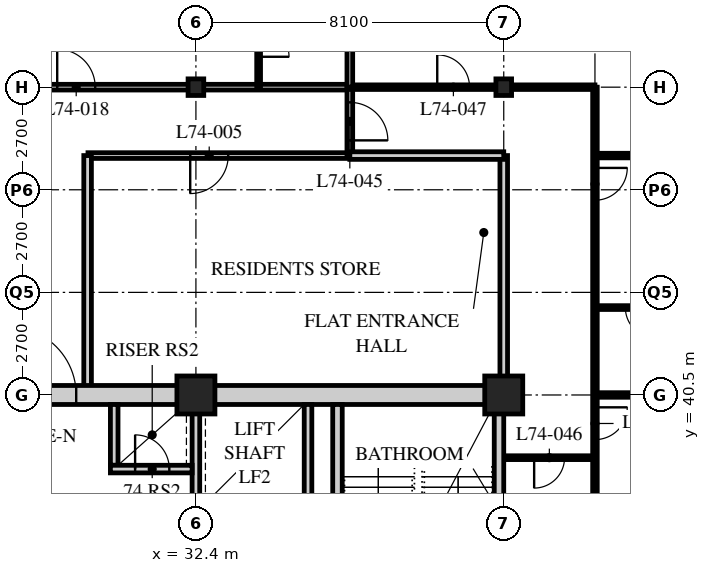
"""IFC4 building model, lengths in metres.
Left out: names, types, materials, properties, quantities, classifications, styles, units other than length and angle.
Written with IfcOpenShell. Run it as: python <this file> out.ifc"""

import sys

from ifc_helpers import new_model, si_unit, direction, frame, frame_2d, origin, origin_2d, place, context, subcontext, project, spatial, rectangle, hollow_rectangle, i_section, extrude, element, fill, save


model = new_model("IFC4")
c1 = context("Model", 3, precision=1e-05, world=origin(), true_north=direction((0.0, 1.0)))
c2 = subcontext(c1, "Body", "Model", "MODEL_VIEW")
j1 = project(units=[si_unit("LENGTHUNIT", "METRE"), si_unit("PLANEANGLEUNIT", "RADIAN")], contexts=[c1])
p1 = place(None, origin())
s1 = spatial("IfcSite", under=j1, at=p1, CompositionType="ELEMENT")
p2 = place(p1, origin())
s2 = spatial("IfcBuilding", under=s1, at=p2, CompositionType="ELEMENT")
p3 = place(p2, frame((0.0, 0.0, 289.2)))
s3 = spatial("IfcBuildingStorey", under=s2, at=p3, CompositionType="ELEMENT", Elevation=289.2)
p4 = place(p3, frame((32.4, 40.5, 0.0), z_axis=(0.0, 0.0, 1.0), x_axis=(1.0, 0.0, 0.0)))
e1 = element("IfcColumn", 1, at=p4, inside=s3, PredefinedType="COLUMN", context=c2, shape_type="SweptSolid", body=[
    extrude(hollow_rectangle(XDim=1.0, YDim=1.0, WallThickness=0.1, at=origin_2d()), origin(), (0.0, 0.0, 1.0), 3.9),
])
p5 = place(p3, frame((32.4, 48.6, 0.0), z_axis=(0.0, 0.0, 1.0), x_axis=(1.0, 0.0, 0.0)))
e2 = element("IfcColumn", 2, at=p5, inside=s3, PredefinedType="COLUMN", context=c2, shape_type="SweptSolid", body=[
    extrude(i_section(OverallWidth=0.412, OverallDepth=0.437, WebThickness=0.036, FlangeThickness=0.058, FilletRadius=0.015, at=origin_2d()), origin(), (0.0, 0.0, 1.0), 3.9),
])
p6 = place(p3, frame((40.5, 40.5, 0.0), z_axis=(0.0, 0.0, 1.0), x_axis=(1.0, 0.0, 0.0)))
e3 = element("IfcColumn", 3, at=p6, inside=s3, PredefinedType="COLUMN", context=c2, shape_type="SweptSolid", body=[
    extrude(hollow_rectangle(XDim=1.0, YDim=1.0, WallThickness=0.1, at=origin_2d()), origin(), (0.0, 0.0, 1.0), 3.9),
])
p7 = place(p3, frame((40.5, 48.6, 0.0), z_axis=(0.0, 0.0, 1.0), x_axis=(1.0, 0.0, 0.0)))
e4 = element("IfcColumn", 4, at=p7, inside=s3, PredefinedType="COLUMN", context=c2, shape_type="SweptSolid", body=[
    extrude(i_section(OverallWidth=0.412, OverallDepth=0.437, WebThickness=0.036, FlangeThickness=0.058, FilletRadius=0.015, at=origin_2d()), origin(), (0.0, 0.0, 1.0), 3.9),
])
p8 = place(p3, frame((12.15, 48.6, 0.0), z_axis=(0.0, 0.0, 1.0), x_axis=(1.0, 0.0, 0.0)))
e5 = element("IfcWall", 5, at=p8, inside=s3, PredefinedType="PARTITIONING", context=c2, shape_type="SweptSolid", body=[
    extrude(rectangle(XDim=24.3, YDim=0.15, at=frame_2d((12.15, 0.0))), origin(), (0.0, 0.0, 1.0), 3.078),
])
p9 = place(p8, frame((4.95, 0.0, 0.0)))
e6 = element("IfcOpeningElement", 6, at=p9, cuts=e5, PredefinedType="OPENING", context=c2, shape_type="SweptSolid", body=[
    extrude(rectangle(XDim=1.0, YDim=2.1, at=frame_2d((0.5, 1.05))), frame((0.0, 0.085, 0.0), z_axis=(0.0, -1.0, 0.0), x_axis=(1.0, 0.0, 0.0)), (0.0, 0.0, 1.0), 0.17),
])
p10 = place(p8, frame((16.6, 0.0, 0.0)))
e7 = element("IfcOpeningElement", 7, at=p10, cuts=e5, PredefinedType="OPENING", context=c2, shape_type="SweptSolid", body=[
    extrude(rectangle(XDim=1.0, YDim=2.1, at=frame_2d((0.5, 1.05))), frame((0.0, 0.085, 0.0), z_axis=(0.0, -1.0, 0.0), x_axis=(1.0, 0.0, 0.0)), (0.0, 0.0, 1.0), 0.17),
])
p11 = place(p8, frame((1.525, 0.0, 0.0)))
e8 = element("IfcOpeningElement", 8, at=p11, cuts=e5, PredefinedType="OPENING", context=c2, shape_type="SweptSolid", body=[
    extrude(rectangle(XDim=1.0, YDim=2.1, at=frame_2d((0.5, 1.05))), frame((0.0, 0.085, 0.0), z_axis=(0.0, -1.0, 0.0), x_axis=(1.0, 0.0, 0.0)), (0.0, 0.0, 1.0), 0.17),
])
p12 = place(p3, frame((29.56, 46.8, 0.0), z_axis=(0.0, 0.0, 1.0), x_axis=(1.0, 0.0, 0.0)))
e9 = element("IfcWall", 9, at=p12, inside=s3, PredefinedType="PARTITIONING", context=c2, shape_type="SweptSolid", body=[
    extrude(rectangle(XDim=6.89, YDim=0.15, at=frame_2d((3.445, 0.0))), origin(), (0.0, 0.0, 1.0), 3.69),
])
p13 = place(p12, frame((2.69, 0.0, 0.0)))
e10 = element("IfcOpeningElement", 10, at=p13, cuts=e9, PredefinedType="OPENING", context=c2, shape_type="SweptSolid", body=[
    extrude(rectangle(XDim=1.0, YDim=2.1, at=frame_2d((0.5, 1.05))), frame((0.0, 0.085, 0.0), z_axis=(0.0, -1.0, 0.0), x_axis=(1.0, 0.0, 0.0)), (0.0, 0.0, 1.0), 0.17),
])
p14 = place(p3, frame((29.55, 40.5, 0.0), z_axis=(0.0, 0.0, 1.0), x_axis=(0.0, 1.0, 0.0)))
e11 = element("IfcWall", 11, at=p14, inside=s3, PredefinedType="SOLIDWALL", context=c2, shape_type="SweptSolid", body=[
    extrude(rectangle(XDim=6.3, YDim=0.2, at=frame_2d((3.15, 0.0))), origin(), (0.0, 0.0, 1.0), 3.69),
])
p15 = place(p3, frame((36.45, 46.8, 0.0), z_axis=(0.0, 0.0, 1.0), x_axis=(0.0, 1.0, 0.0)))
e12 = element("IfcWall", 12, at=p15, inside=s3, PredefinedType="PARTITIONING", context=c2, shape_type="SweptSolid", body=[
    extrude(rectangle(XDim=1.8, YDim=0.15, at=frame_2d((0.9, 0.0))), origin(), (0.0, 0.0, 1.0), 3.69),
])
p16 = place(p15, frame((0.4, 0.0, 0.0)))
e13 = element("IfcOpeningElement", 13, at=p16, cuts=e12, PredefinedType="OPENING", context=c2, shape_type="SweptSolid", body=[
    extrude(rectangle(XDim=1.0, YDim=2.1, at=frame_2d((0.5, 1.05))), frame((0.0, 0.085, 0.0), z_axis=(0.0, -1.0, 0.0), x_axis=(1.0, 0.0, 0.0)), (0.0, 0.0, 1.0), 0.17),
])
p17 = place(p3, frame((40.5, 40.5, 0.0), z_axis=(0.0, 0.0, 1.0), x_axis=(0.0, 1.0, 0.0)))
e14 = element("IfcWall", 14, at=p17, inside=s3, PredefinedType="SOLIDWALL", context=c2, shape_type="SweptSolid", body=[
    extrude(rectangle(XDim=6.3, YDim=0.2, at=frame_2d((3.15, 0.0))), origin(), (0.0, 0.0, 1.0), 3.078),
])
p18 = place(p3, frame((34.05, 48.6, 0.0), z_axis=(0.0, 0.0, 1.0), x_axis=(0.0, 1.0, 0.0)))
e15 = element("IfcWall", 15, at=p18, inside=s3, PredefinedType="PARTITIONING", context=c2, shape_type="SweptSolid", body=[
    extrude(rectangle(XDim=2.4, YDim=0.1, at=frame_2d((1.2, 0.0))), origin(), (0.0, 0.0, 1.0), 3.69),
])
p19 = place(p18, frame((0.8, 0.0, 0.0)))
e16 = element("IfcOpeningElement", 16, at=p19, cuts=e15, PredefinedType="OPENING", context=c2, shape_type="SweptSolid", body=[
    extrude(rectangle(XDim=0.8, YDim=2.1, at=frame_2d((0.4, 1.05))), frame((0.0, 0.06, 0.0), z_axis=(0.0, -1.0, 0.0), x_axis=(1.0, 0.0, 0.0)), (0.0, 0.0, 1.0), 0.12),
])
p20 = place(p3, frame((40.5, 38.85, 0.0), z_axis=(0.0, 0.0, 1.0), x_axis=(1.0, 0.0, 0.0)))
e17 = element("IfcWall", 17, at=p20, inside=s3, PredefinedType="PARTITIONING", context=c2, shape_type="SweptSolid", body=[
    extrude(rectangle(XDim=2.4, YDim=0.1, at=frame_2d((1.2, 0.0))), origin(), (0.0, 0.0, 1.0), 3.69),
])
p21 = place(p20, frame((0.8, 0.0, 0.0)))
e18 = element("IfcOpeningElement", 18, at=p21, cuts=e17, PredefinedType="OPENING", context=c2, shape_type="SweptSolid", body=[
    extrude(rectangle(XDim=0.8, YDim=2.1, at=frame_2d((0.4, 1.05))), frame((0.0, 0.06, 0.0), z_axis=(0.0, -1.0, 0.0), x_axis=(1.0, 0.0, 0.0)), (0.0, 0.0, 1.0), 0.12),
])
p22 = place(p3, frame((42.9, 48.6, 0.0), z_axis=(0.0, 0.0, 1.0), x_axis=(0.0, -1.0, 0.0)))
e19 = element("IfcWall", 19, at=p22, inside=s3, PredefinedType="PARTITIONING", context=c2, shape_type="SweptSolid", body=[
    extrude(rectangle(XDim=12.15, YDim=0.12, at=frame_2d((6.075, 0.0))), origin(), (0.0, 0.0, 1.0), 3.69),
])
p23 = place(p22, frame((2.125, 0.0, 0.0)))
e20 = element("IfcOpeningElement", 20, at=p23, cuts=e19, PredefinedType="OPENING", context=c2, shape_type="SweptSolid", body=[
    extrude(rectangle(XDim=0.85, YDim=2.1, at=frame_2d((0.425, 1.05))), frame((0.0, 0.07, 0.0), z_axis=(0.0, -1.0, 0.0), x_axis=(1.0, 0.0, 0.0)), (0.0, 0.0, 1.0), 0.14),
])
p24 = place(p22, frame((8.425, 0.0, 0.0)))
e21 = element("IfcOpeningElement", 21, at=p24, cuts=e19, PredefinedType="OPENING", context=c2, shape_type="SweptSolid", body=[
    extrude(rectangle(XDim=0.85, YDim=2.1, at=frame_2d((0.425, 1.05))), frame((0.0, 0.07, 0.0), z_axis=(0.0, -1.0, 0.0), x_axis=(1.0, 0.0, 0.0)), (0.0, 0.0, 1.0), 0.14),
])
p25 = place(p3, frame((36.45, 48.6, 0.0), z_axis=(0.0, 0.0, 1.0), x_axis=(1.0, 0.0, 0.0)))
e22 = element("IfcWall", 22, at=p25, inside=s3, PredefinedType="PARTITIONING", context=c2, shape_type="SweptSolid", body=[
    extrude(rectangle(XDim=6.45, YDim=0.12, at=frame_2d((3.225, 0.0))), origin(), (0.0, 0.0, 1.0), 3.078),
])
p26 = place(p25, frame((2.3, 0.0, 0.0)))
e23 = element("IfcOpeningElement", 23, at=p26, cuts=e22, PredefinedType="OPENING", context=c2, shape_type="SweptSolid", body=[
    extrude(rectangle(XDim=0.85, YDim=2.1, at=frame_2d((0.425, 1.05))), frame((0.0, 0.07, 0.0), z_axis=(0.0, -1.0, 0.0), x_axis=(1.0, 0.0, 0.0)), (0.0, 0.0, 1.0), 0.14),
])
p27 = place(p3, frame((36.45, 46.8, 0.0), z_axis=(0.0, 0.0, 1.0), x_axis=(1.0, 0.0, 0.0)))
e24 = element("IfcWall", 24, at=p27, inside=s3, PredefinedType="SOLIDWALL", context=c2, shape_type="SweptSolid", body=[
    extrude(rectangle(XDim=4.05, YDim=0.2, at=frame_2d((2.025, 0.0))), origin(), (0.0, 0.0, 1.0), 3.69),
])
p28 = place(p3, frame((42.9, 46.8, 0.0), z_axis=(0.0, 0.0, 1.0), x_axis=(1.0, 0.0, 0.0)))
e25 = element("IfcWall", 25, at=p28, inside=s3, PredefinedType="PARTITIONING", context=c2, shape_type="SweptSolid", body=[
    extrude(rectangle(XDim=13.5, YDim=0.12, at=frame_2d((6.75, 0.0))), origin(), (0.0, 0.0, 1.0), 3.69),
])
p29 = place(p3, frame((36.45, 64.5, 0.0), z_axis=(0.0, 0.0, 1.0), x_axis=(0.0, -1.0, 0.0)))
e26 = element("IfcWall", 26, at=p29, inside=s3, PredefinedType="PARTITIONING", context=c2, shape_type="SweptSolid", body=[
    extrude(rectangle(XDim=15.9, YDim=0.15, at=frame_2d((7.95, 0.0))), origin(), (0.0, 0.0, 1.0), 3.69),
])
p30 = place(p3, frame((42.9, 42.8, 0.0), z_axis=(0.0, 0.0, 1.0), x_axis=(1.0, 0.0, 0.0)))
e27 = element("IfcWall", 27, at=p30, inside=s3, PredefinedType="PARTITIONING", context=c2, shape_type="SweptSolid", body=[
    extrude(rectangle(XDim=2.4, YDim=0.1, at=frame_2d((1.2, 0.0))), origin(), (0.0, 0.0, 1.0), 3.69),
])
p31 = place(p30, frame((0.8, 0.0, 0.0)))
e28 = element("IfcOpeningElement", 28, at=p31, cuts=e27, PredefinedType="OPENING", context=c2, shape_type="SweptSolid", body=[
    extrude(rectangle(XDim=0.8, YDim=2.1, at=frame_2d((0.4, 1.05))), frame((0.0, 0.06, 0.0), z_axis=(0.0, -1.0, 0.0), x_axis=(1.0, 0.0, 0.0)), (0.0, 0.0, 1.0), 0.12),
])
p32 = place(p3, frame((42.9, 40.5, 0.0), z_axis=(0.0, 0.0, 1.0), x_axis=(1.0, 0.0, 0.0)))
e29 = element("IfcWall", 29, at=p32, inside=s3, PredefinedType="PARTITIONING", context=c2, shape_type="SweptSolid", body=[
    extrude(rectangle(XDim=13.5, YDim=0.12, at=frame_2d((6.75, 0.0))), origin(), (0.0, 0.0, 1.0), 3.078),
])
p33 = place(p3, frame((15.95, 40.5, 0.0), z_axis=(0.0, 0.0, 1.0), x_axis=(1.0, 0.0, 0.0)))
e30 = element("IfcWall", 30, at=p33, inside=s3, PredefinedType="SOLIDWALL", context=c2, shape_type="SweptSolid", body=[
    extrude(rectangle(XDim=24.55, YDim=0.5, at=frame_2d((12.275, 0.0))), origin(), (0.0, 0.0, 1.0), 3.04),
])
p34 = place(p33, frame((11.5, 0.0, 0.0)))
e31 = element("IfcOpeningElement", 31, at=p34, cuts=e30, PredefinedType="OPENING", context=c2, shape_type="SweptSolid", body=[
    extrude(rectangle(XDim=1.8, YDim=2.4, at=frame_2d((0.9, 1.2))), frame((0.0, 0.26, 0.0), z_axis=(0.0, -1.0, 0.0), x_axis=(1.0, 0.0, 0.0)), (0.0, 0.0, 1.0), 0.52),
])
p35 = place(p3, frame((40.375, 24.55, 0.0), z_axis=(0.0, 0.0, 1.0), x_axis=(0.0, 1.0, 0.0)))
e32 = element("IfcWall", 32, at=p35, inside=s3, PredefinedType="SOLIDWALL", context=c2, shape_type="SweptSolid", body=[
    extrude(rectangle(XDim=15.7, YDim=0.25, at=frame_2d((7.85, 0.0))), origin(), (0.0, 0.0, 1.0), 3.078),
])
p36 = place(p3, frame((32.4, 32.5, 0.0), z_axis=(0.0, 0.0, 1.0), x_axis=(0.0, 1.0, 0.0)))
e33 = element("IfcWall", 33, at=p36, inside=s3, PredefinedType="SOLIDWALL", context=c2, shape_type="SweptSolid", body=[
    extrude(rectangle(XDim=7.75, YDim=0.2, at=frame_2d((3.875, 0.0))), origin(), (0.0, 0.0, 1.0), 3.078),
])
p37 = place(p36, frame((1.9, 0.0, 0.0)))
e34 = element("IfcOpeningElement", 34, at=p37, cuts=e33, PredefinedType="OPENING", context=c2, shape_type="SweptSolid", body=[
    extrude(rectangle(XDim=1.2, YDim=2.1, at=frame_2d((0.6, 1.05))), frame((0.0, 0.11, 0.0), z_axis=(0.0, -1.0, 0.0), x_axis=(1.0, 0.0, 0.0)), (0.0, 0.0, 1.0), 0.22),
])
p38 = place(p3, frame((36.125, 32.5, 0.0), z_axis=(0.0, 0.0, 1.0), x_axis=(0.0, 1.0, 0.0)))
e35 = element("IfcWall", 35, at=p38, inside=s3, PredefinedType="SOLIDWALL", context=c2, shape_type="SweptSolid", body=[
    extrude(rectangle(XDim=7.75, YDim=0.25, at=frame_2d((3.875, 0.0))), origin(), (0.0, 0.0, 1.0), 3.69),
])
p39 = place(p38, frame((0.45, 0.0, 0.0)))
e36 = element("IfcOpeningElement", 36, at=p39, cuts=e35, PredefinedType="OPENING", context=c2, shape_type="SweptSolid", body=[
    extrude(rectangle(XDim=1.2, YDim=2.1, at=frame_2d((0.6, 1.05))), frame((0.0, 0.135, 0.0), z_axis=(0.0, -1.0, 0.0), x_axis=(1.0, 0.0, 0.0)), (0.0, 0.0, 1.0), 0.27),
])
p40 = place(p3, frame((35.35, 37.65, 0.0), z_axis=(0.0, 0.0, 1.0), x_axis=(0.0, 1.0, 0.0)))
e37 = element("IfcWall", 37, at=p40, inside=s3, PredefinedType="SOLIDWALL", context=c2, shape_type="SweptSolid", body=[
    extrude(rectangle(XDim=2.6, YDim=0.2, at=frame_2d((1.3, 0.0))), origin(), (0.0, 0.0, 1.0), 3.69),
])
p41 = place(p3, frame((30.25, 38.65, 0.0), z_axis=(0.0, 0.0, 1.0), x_axis=(0.0, 1.0, 0.0)))
e38 = element("IfcWall", 38, at=p41, inside=s3, PredefinedType="SOLIDWALL", context=c2, shape_type="SweptSolid", body=[
    extrude(rectangle(XDim=1.6, YDim=0.2, at=frame_2d((0.8, 0.0))), origin(), (0.0, 0.0, 1.0), 3.69),
])
p42 = place(p3, frame((30.15, 38.55, 0.0), z_axis=(0.0, 0.0, 1.0), x_axis=(1.0, 0.0, 0.0)))
e39 = element("IfcWall", 39, at=p42, inside=s3, PredefinedType="SOLIDWALL", context=c2, shape_type="SweptSolid", body=[
    extrude(rectangle(XDim=2.15, YDim=0.2, at=frame_2d((1.075, 0.0))), origin(), (0.0, 0.0, 1.0), 3.69),
])
p43 = place(p42, frame((0.65, 0.0, 0.0)))
e40 = element("IfcOpeningElement", 40, at=p43, cuts=e39, PredefinedType="OPENING", context=c2, shape_type="SweptSolid", body=[
    extrude(rectangle(XDim=0.9, YDim=2.1, at=frame_2d((0.45, 1.05))), frame((0.0, 0.11, 0.0), z_axis=(0.0, -1.0, 0.0), x_axis=(1.0, 0.0, 0.0)), (0.0, 0.0, 1.0), 0.22),
])
p44 = place(p13, origin())
e41 = element("IfcDoor", 41, at=p44, inside=s3, OperationType="SINGLE_SWING_RIGHT", PredefinedType="DOOR", context=c2, shape_type="SweptSolid", body=[
    extrude(rectangle(XDim=1.0, YDim=2.1, at=frame_2d((0.5, 1.05))), frame((0.0, 0.025, 0.0), z_axis=(0.0, -1.0, 0.0), x_axis=(1.0, 0.0, 0.0)), (0.0, 0.0, 1.0), 0.05),
])
fill(e10, e41)
p45 = place(p19, origin())
e42 = element("IfcDoor", 42, at=p45, inside=s3, OperationType="SINGLE_SWING_RIGHT", PredefinedType="DOOR", context=c2, shape_type="SweptSolid", body=[
    extrude(rectangle(XDim=0.8, YDim=2.1, at=frame_2d((0.4, 1.05))), frame((0.0, 0.025, 0.0), z_axis=(0.0, -1.0, 0.0), x_axis=(1.0, 0.0, 0.0)), (0.0, 0.0, 1.0), 0.05),
])
fill(e16, e42)
p46 = place(p10, origin())
e43 = element("IfcDoor", 43, at=p46, inside=s3, OperationType="SINGLE_SWING_LEFT", PredefinedType="DOOR", context=c2, shape_type="SweptSolid", body=[
    extrude(rectangle(XDim=1.0, YDim=2.1, at=frame_2d((0.5, 1.05))), frame((0.0, 0.025, 0.0), z_axis=(0.0, -1.0, 0.0), x_axis=(1.0, 0.0, 0.0)), (0.0, 0.0, 1.0), 0.05),
])
fill(e7, e43)
p47 = place(p16, origin())
e44 = element("IfcDoor", 44, at=p47, inside=s3, OperationType="SINGLE_SWING_RIGHT", PredefinedType="DOOR", context=c2, shape_type="SweptSolid", body=[
    extrude(rectangle(XDim=1.0, YDim=2.1, at=frame_2d((0.5, 1.05))), frame((0.0, 0.025, 0.0), z_axis=(0.0, -1.0, 0.0), x_axis=(1.0, 0.0, 0.0)), (0.0, 0.0, 1.0), 0.05),
])
fill(e13, e44)
p48 = place(p21, origin())
e45 = element("IfcDoor", 45, at=p48, inside=s3, OperationType="SINGLE_SWING_RIGHT", PredefinedType="DOOR", context=c2, shape_type="SweptSolid", body=[
    extrude(rectangle(XDim=0.8, YDim=2.1, at=frame_2d((0.4, 1.05))), frame((0.0, 0.025, 0.0), z_axis=(0.0, -1.0, 0.0), x_axis=(1.0, 0.0, 0.0)), (0.0, 0.0, 1.0), 0.05),
])
fill(e18, e45)
p49 = place(p26, origin())
e46 = element("IfcDoor", 46, at=p49, inside=s3, OperationType="SINGLE_SWING_LEFT", PredefinedType="DOOR", context=c2, shape_type="SweptSolid", body=[
    extrude(rectangle(XDim=0.85, YDim=2.1, at=frame_2d((0.425, 1.05))), frame((0.0, 0.025, 0.0), z_axis=(0.0, -1.0, 0.0), x_axis=(1.0, 0.0, 0.0)), (0.0, 0.0, 1.0), 0.05),
])
fill(e23, e46)
p50 = place(p31, origin())
e47 = element("IfcDoor", 47, at=p50, inside=s3, OperationType="SINGLE_SWING_LEFT", PredefinedType="DOOR", context=c2, shape_type="SweptSolid", body=[
    extrude(rectangle(XDim=0.8, YDim=2.1, at=frame_2d((0.4, 1.05))), frame((0.0, 0.025, 0.0), z_axis=(0.0, -1.0, 0.0), x_axis=(1.0, 0.0, 0.0)), (0.0, 0.0, 1.0), 0.05),
])
fill(e28, e47)
p51 = place(p23, origin())
e48 = element("IfcDoor", 48, at=p51, inside=s3, OperationType="SINGLE_SWING_LEFT", PredefinedType="DOOR", context=c2, shape_type="SweptSolid", body=[
    extrude(rectangle(XDim=0.85, YDim=2.1, at=frame_2d((0.425, 1.05))), frame((0.0, 0.025, 0.0), z_axis=(0.0, -1.0, 0.0), x_axis=(1.0, 0.0, 0.0)), (0.0, 0.0, 1.0), 0.05),
])
fill(e20, e48)
p52 = place(p24, origin())
e49 = element("IfcDoor", 49, at=p52, inside=s3, OperationType="SINGLE_SWING_LEFT", PredefinedType="DOOR", context=c2, shape_type="SweptSolid", body=[
    extrude(rectangle(XDim=0.85, YDim=2.1, at=frame_2d((0.425, 1.05))), frame((0.0, 0.025, 0.0), z_axis=(0.0, -1.0, 0.0), x_axis=(1.0, 0.0, 0.0)), (0.0, 0.0, 1.0), 0.05),
])
fill(e21, e49)
p53 = place(p43, origin())
e50 = element("IfcDoor", 50, at=p53, inside=s3, OperationType="SINGLE_SWING_LEFT", PredefinedType="DOOR", context=c2, shape_type="SweptSolid", body=[
    extrude(rectangle(XDim=0.9, YDim=2.1, at=frame_2d((0.45, 1.05))), frame((0.0, 0.025, 0.0), z_axis=(0.0, -1.0, 0.0), x_axis=(1.0, 0.0, 0.0)), (0.0, 0.0, 1.0), 0.05),
])
fill(e40, e50)
p54 = place(p34, origin())
e51 = element("IfcDoor", 51, at=p54, inside=s3, OperationType="DOUBLE_DOOR_SINGLE_SWING", PredefinedType="DOOR", context=c2, shape_type="SweptSolid", body=[
    extrude(rectangle(XDim=1.8, YDim=2.4, at=frame_2d((0.9, 1.2))), frame((0.0, 0.025, 0.0), z_axis=(0.0, -1.0, 0.0), x_axis=(1.0, 0.0, 0.0)), (0.0, 0.0, 1.0), 0.05),
])
fill(e31, e51)
save(model, sys.argv[1])
